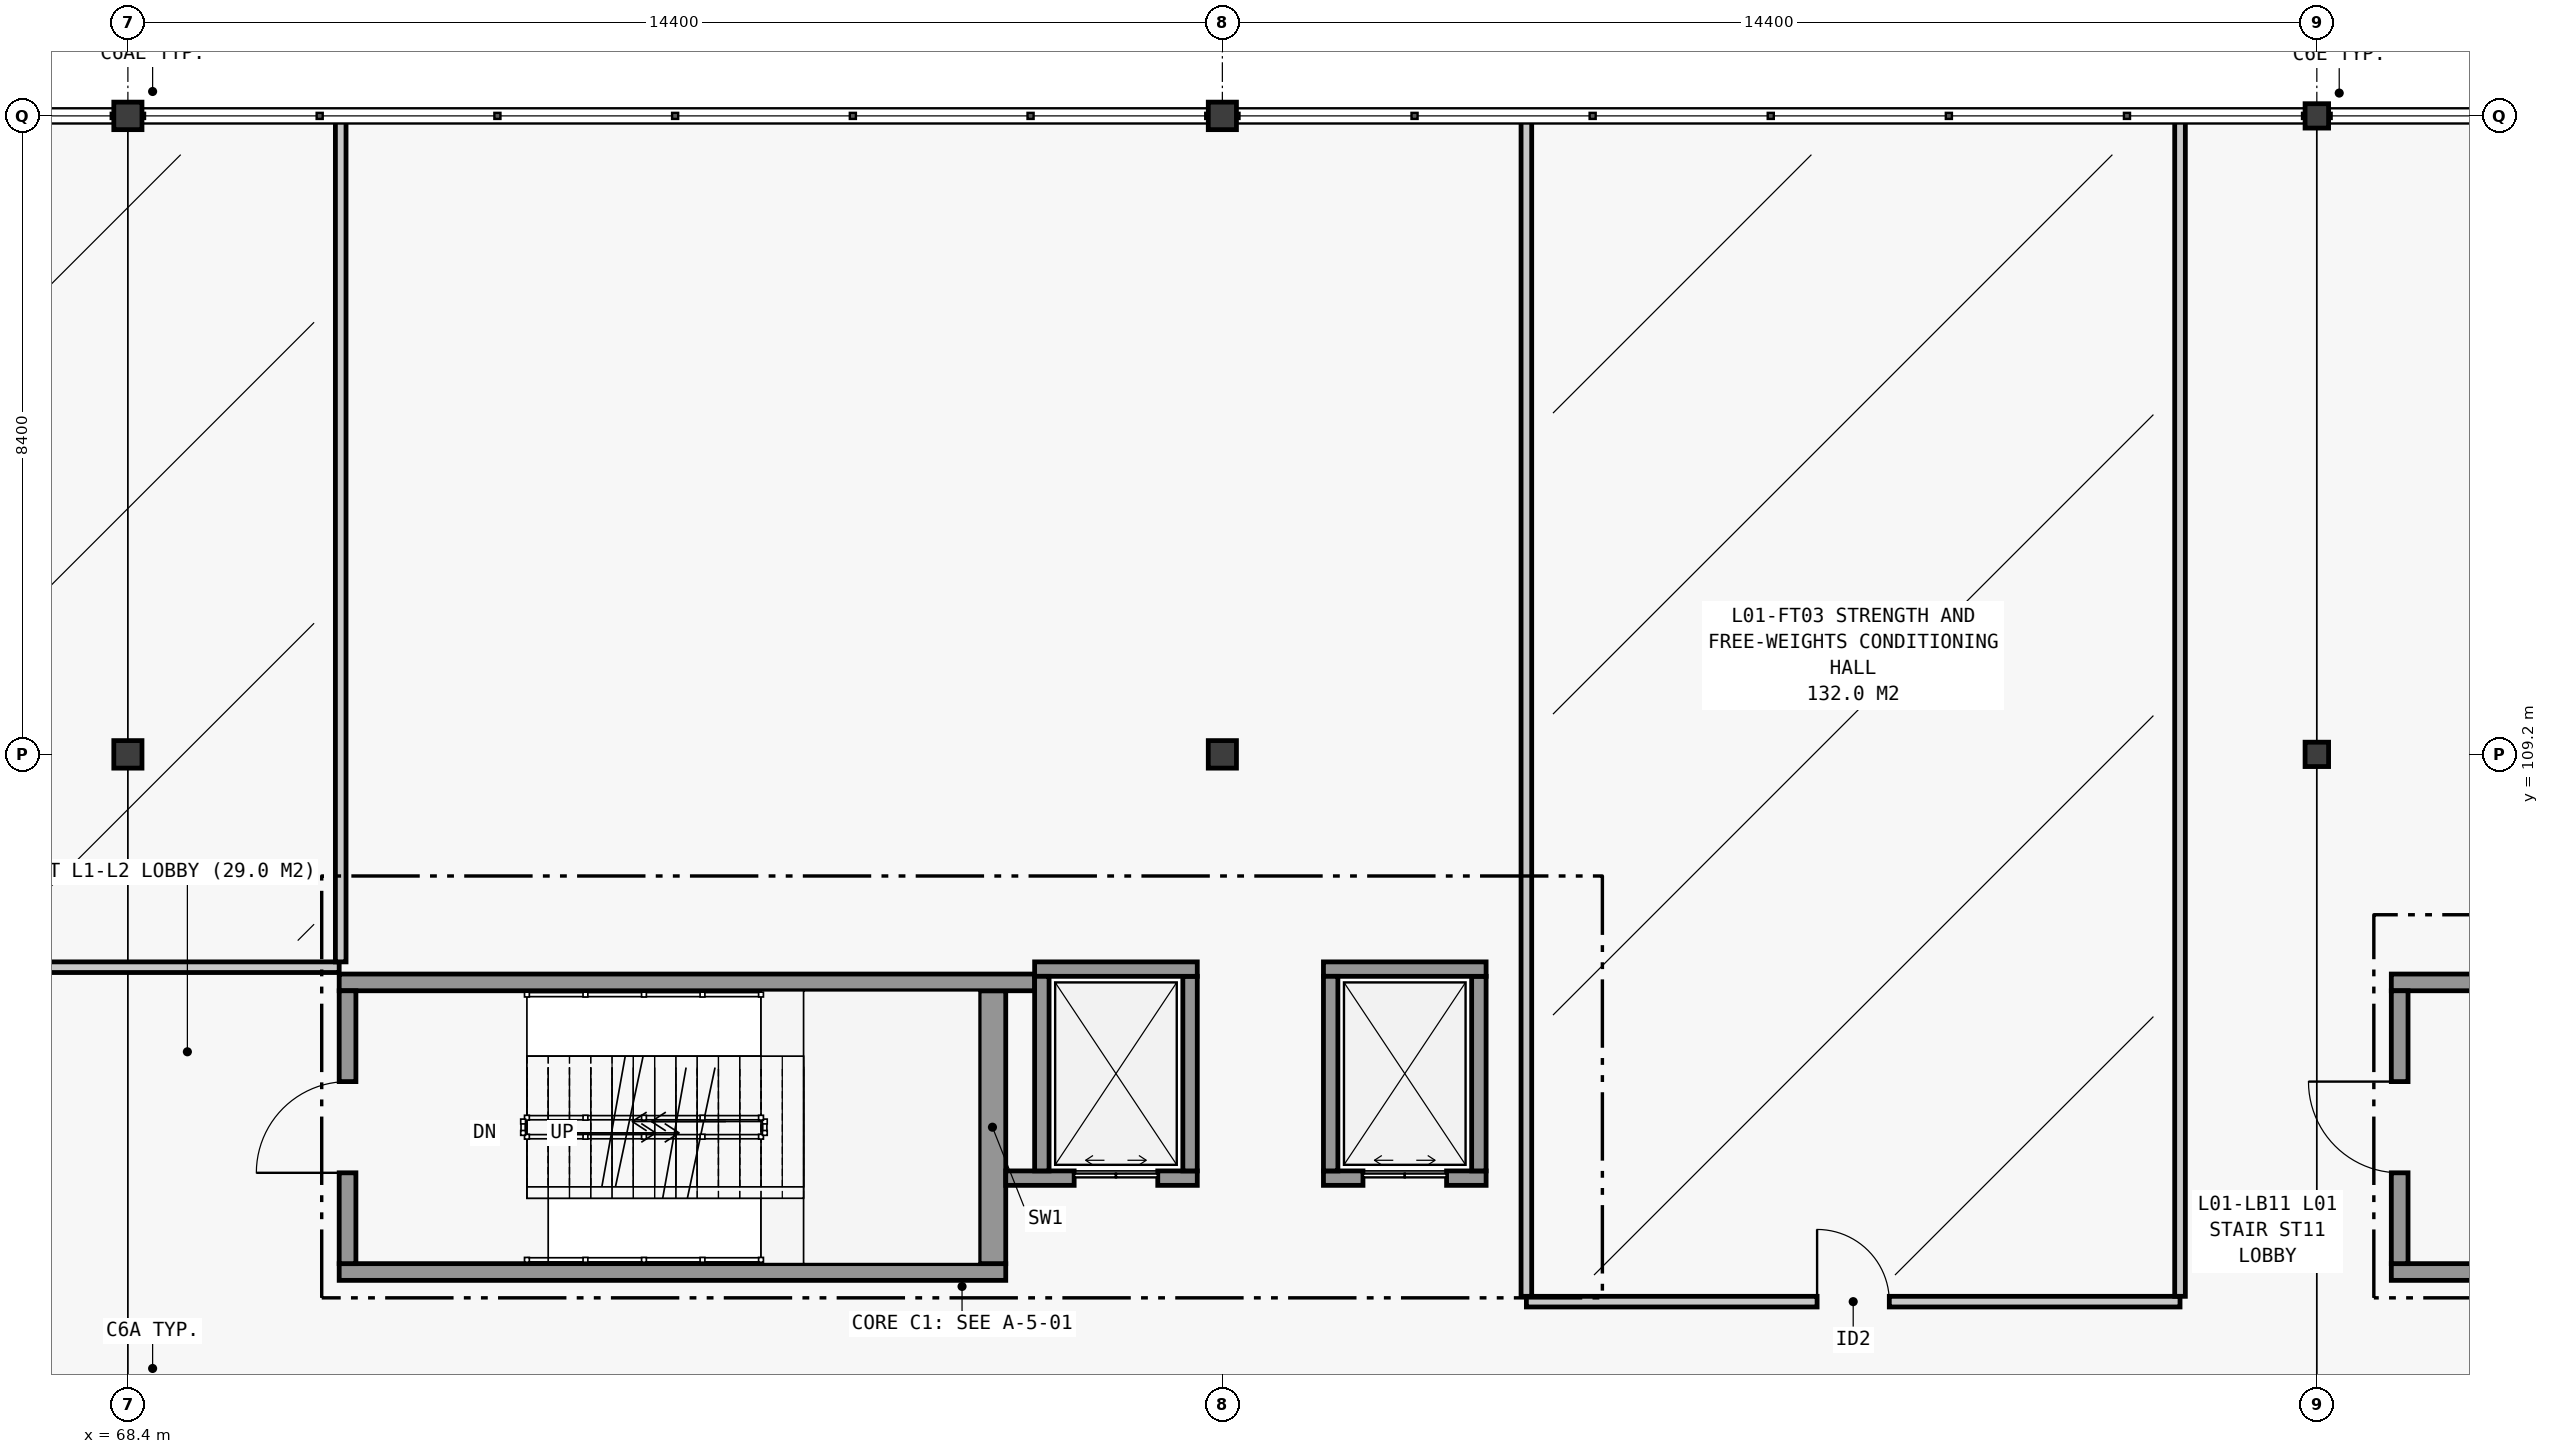
"""IFC4 building model, lengths in metres.
Left out: names, types, materials, properties, quantities, classifications, styles, units other than length and angle.
Written with IfcOpenShell. Run it as: python <this file> out.ifc"""

import sys

from ifc_helpers import new_model, si_unit, direction, frame, frame_2d, origin, origin_2d, place, context, subcontext, project, spatial, rectangle, i_section, extrude, element, fill, save


model = new_model("IFC4")
c1 = context("Model", 3, precision=1e-05, world=origin(), true_north=direction((0.0, 1.0)))
c2 = subcontext(c1, "Body", "Model", "MODEL_VIEW")
j1 = project(units=[si_unit("LENGTHUNIT", "METRE"), si_unit("PLANEANGLEUNIT", "RADIAN")], contexts=[c1])
p1 = place(None, origin())
s1 = spatial("IfcSite", under=j1, at=p1, CompositionType="ELEMENT")
p2 = place(p1, origin())
s2 = spatial("IfcBuilding", under=s1, at=p2, CompositionType="ELEMENT")
p3 = place(p2, frame((0.0, 0.0, 4.8)))
s3 = spatial("IfcBuildingStorey", under=s2, at=p3, CompositionType="ELEMENT", Elevation=4.8)
for number, where, z_axis, x_axis in (
    (1, (68.4, 109.2, 0.0), (0.0, 0.0, 1.0), (1.0, 0.0, 0.0)),
    (2, (68.4, 117.6, 0.0), (0.0, 0.0, 1.0), (1.0, 0.0, 0.0)),
    (3, (82.8, 109.2, 0.0), (0.0, 0.0, 1.0), (1.0, 0.0, 0.0)),
    (4, (82.8, 117.6, 0.0), (0.0, 0.0, 1.0), (1.0, 0.0, 0.0)),
):
    element("IfcColumn", number, at=place(p3, frame(where, z_axis=z_axis, x_axis=x_axis)), inside=s3, PredefinedType="COLUMN", context=c2, shape_type="SweptSolid", body=[
        extrude(i_section(OverallWidth=0.371, OverallDepth=0.362, WebThickness=0.012, FlangeThickness=0.021, FilletRadius=0.015, at=origin_2d()), origin(), (0.0, 0.0, 1.0), 4.2),
    ])
for number, where, z_axis, x_axis in (
    (5, (97.2, 109.2, 0.0), (0.0, 0.0, 1.0), (1.0, 0.0, 0.0)),
    (6, (97.2, 117.6, 0.0), (0.0, 0.0, 1.0), (1.0, 0.0, 0.0)),
):
    element("IfcColumn", number, at=place(p3, frame(where, z_axis=z_axis, x_axis=x_axis)), inside=s3, PredefinedType="COLUMN", context=c2, shape_type="SweptSolid", body=[
        extrude(i_section(OverallWidth=0.309, OverallDepth=0.321, WebThickness=0.014, FlangeThickness=0.022, FilletRadius=0.015, at=origin_2d()), origin(), (0.0, 0.0, 1.0), 4.2),
    ])
p4 = place(p3, frame((71.18, 102.39, 0.0), z_axis=(0.0, 0.0, 1.0), x_axis=(1.0, 0.0, 0.0)))
e7 = element("IfcWall", 7, at=p4, inside=s3, PredefinedType="SOLIDWALL", context=c2, shape_type="SweptSolid", body=[
    extrude(rectangle(XDim=8.77, YDim=0.22, at=frame_2d((4.385, 0.0))), origin(), (0.0, 0.0, 1.0), 3.94),
])
p5 = place(p3, frame((79.775, 102.5, 0.0), z_axis=(0.0, 0.0, 1.0), x_axis=(0.0, 1.0, 0.0)))
e8 = element("IfcWall", 8, at=p5, inside=s3, PredefinedType="SHEAR", context=c2, shape_type="SweptSolid", body=[
    extrude(rectangle(XDim=3.59, YDim=0.35, at=frame_2d((1.795, 0.0))), origin(), (0.0, 0.0, 1.0), 3.94),
])
p6 = place(p3, frame((80.33, 106.2, 0.0), z_axis=(0.0, 0.0, 1.0), x_axis=(-1.0, 0.0, 0.0)))
e9 = element("IfcWall", 9, at=p6, inside=s3, PredefinedType="SOLIDWALL", context=c2, shape_type="SweptSolid", body=[
    extrude(rectangle(XDim=9.15, YDim=0.22, at=frame_2d((4.575, 0.0))), origin(), (0.0, 0.0, 1.0), 3.94),
])
p7 = place(p3, frame((71.29, 106.09, 0.0), z_axis=(0.0, 0.0, 1.0), x_axis=(0.0, -1.0, 0.0)))
e10 = element("IfcWall", 10, at=p7, inside=s3, PredefinedType="SOLIDWALL", context=c2, shape_type="SweptSolid", body=[
    extrude(rectangle(XDim=3.59, YDim=0.22, at=frame_2d((1.795, 0.0))), origin(), (0.0, 0.0, 1.0), 3.94),
])
p8 = place(p7, frame((1.195, 0.0, 0.0)))
e11 = element("IfcOpeningElement", 11, at=p8, cuts=e10, PredefinedType="OPENING", context=c2, shape_type="SweptSolid", body=[
    extrude(rectangle(XDim=1.2, YDim=2.2, at=frame_2d((0.6, 1.1))), frame((0.0, 0.125, 0.0), z_axis=(0.0, -1.0, 0.0), x_axis=(1.0, 0.0, 0.0)), (0.0, 0.0, 1.0), 0.25),
])
for number, where, z_axis, x_axis in (
    (12, (98.18, 102.39, 0.0), (0.0, 0.0, 1.0), (1.0, 0.0, 0.0)),
    (13, (106.95, 106.2, 0.0), (0.0, 0.0, 1.0), (-1.0, 0.0, 0.0)),
):
    element("IfcWall", number, at=place(p3, frame(where, z_axis=z_axis, x_axis=x_axis)), inside=s3, PredefinedType="SOLIDWALL", context=c2, shape_type="SweptSolid", body=[
        extrude(rectangle(XDim=8.77, YDim=0.22, at=frame_2d((4.385, 0.0))), origin(), (0.0, 0.0, 1.0), 3.94),
    ])
p9 = place(p3, frame((98.29, 106.09, 0.0), z_axis=(0.0, 0.0, 1.0), x_axis=(0.0, -1.0, 0.0)))
e14 = element("IfcWall", 14, at=p9, inside=s3, PredefinedType="SOLIDWALL", context=c2, shape_type="SweptSolid", body=[
    extrude(rectangle(XDim=3.59, YDim=0.22, at=frame_2d((1.795, 0.0))), origin(), (0.0, 0.0, 1.0), 3.94),
])
p10 = place(p9, frame((1.195, 0.0, 0.0)))
e15 = element("IfcOpeningElement", 15, at=p10, cuts=e14, PredefinedType="OPENING", context=c2, shape_type="SweptSolid", body=[
    extrude(rectangle(XDim=1.2, YDim=2.2, at=frame_2d((0.6, 1.1))), frame((0.0, 0.125, 0.0), z_axis=(0.0, -1.0, 0.0), x_axis=(1.0, 0.0, 0.0)), (0.0, 0.0, 1.0), 0.25),
])
p11 = place(p3, frame((79.95, 103.625, 0.0), z_axis=(0.0, 0.0, 1.0), x_axis=(1.0, 0.0, 0.0)))
e16 = element("IfcWall", 16, at=p11, inside=s3, PredefinedType="SOLIDWALL", context=c2, shape_type="SweptSolid", body=[
    extrude(rectangle(XDim=2.52, YDim=0.19, at=frame_2d((1.26, 0.0))), origin(), (0.0, 0.0, 1.0), 3.94),
])
p12 = place(p11, frame((0.9, 0.0, 0.0)))
e17 = element("IfcOpeningElement", 17, at=p12, cuts=e16, PredefinedType="OPENING", context=c2, shape_type="SweptSolid", body=[
    extrude(rectangle(XDim=1.1, YDim=2.2, at=frame_2d((0.55, 1.1))), frame((0.0, 0.11, 0.0), z_axis=(0.0, -1.0, 0.0), x_axis=(1.0, 0.0, 0.0)), (0.0, 0.0, 1.0), 0.22),
])
p13 = place(p3, frame((82.375, 103.72, 0.0), z_axis=(0.0, 0.0, 1.0), x_axis=(0.0, 1.0, 0.0)))
e18 = element("IfcWall", 18, at=p13, inside=s3, PredefinedType="SOLIDWALL", context=c2, shape_type="SweptSolid", body=[
    extrude(rectangle(XDim=2.56, YDim=0.19, at=frame_2d((1.28, 0.0))), origin(), (0.0, 0.0, 1.0), 3.94),
])
p14 = place(p3, frame((82.47, 106.375, 0.0), z_axis=(0.0, 0.0, 1.0), x_axis=(-1.0, 0.0, 0.0)))
e19 = element("IfcWall", 19, at=p14, inside=s3, PredefinedType="SOLIDWALL", context=c2, shape_type="SweptSolid", body=[
    extrude(rectangle(XDim=2.14, YDim=0.19, at=frame_2d((1.07, 0.0))), origin(), (0.0, 0.0, 1.0), 3.94),
])
p15 = place(p3, frame((80.425, 106.28, 0.0), z_axis=(0.0, 0.0, 1.0), x_axis=(0.0, -1.0, 0.0)))
e20 = element("IfcWall", 20, at=p15, inside=s3, PredefinedType="SOLIDWALL", context=c2, shape_type="SweptSolid", body=[
    extrude(rectangle(XDim=2.56, YDim=0.19, at=frame_2d((1.28, 0.0))), origin(), (0.0, 0.0, 1.0), 3.94),
])
p16 = place(p3, frame((84.13, 103.625, 0.0), z_axis=(0.0, 0.0, 1.0), x_axis=(1.0, 0.0, 0.0)))
e21 = element("IfcWall", 21, at=p16, inside=s3, PredefinedType="SOLIDWALL", context=c2, shape_type="SweptSolid", body=[
    extrude(rectangle(XDim=2.14, YDim=0.19, at=frame_2d((1.07, 0.0))), origin(), (0.0, 0.0, 1.0), 3.94),
])
p17 = place(p16, frame((0.52, 0.0, 0.0)))
e22 = element("IfcOpeningElement", 22, at=p17, cuts=e21, PredefinedType="OPENING", context=c2, shape_type="SweptSolid", body=[
    extrude(rectangle(XDim=1.1, YDim=2.2, at=frame_2d((0.55, 1.1))), frame((0.0, 0.11, 0.0), z_axis=(0.0, -1.0, 0.0), x_axis=(1.0, 0.0, 0.0)), (0.0, 0.0, 1.0), 0.22),
])
p18 = place(p3, frame((86.175, 103.72, 0.0), z_axis=(0.0, 0.0, 1.0), x_axis=(0.0, 1.0, 0.0)))
e23 = element("IfcWall", 23, at=p18, inside=s3, PredefinedType="SOLIDWALL", context=c2, shape_type="SweptSolid", body=[
    extrude(rectangle(XDim=2.56, YDim=0.19, at=frame_2d((1.28, 0.0))), origin(), (0.0, 0.0, 1.0), 3.94),
])
p19 = place(p3, frame((86.27, 106.375, 0.0), z_axis=(0.0, 0.0, 1.0), x_axis=(-1.0, 0.0, 0.0)))
e24 = element("IfcWall", 24, at=p19, inside=s3, PredefinedType="SOLIDWALL", context=c2, shape_type="SweptSolid", body=[
    extrude(rectangle(XDim=2.14, YDim=0.19, at=frame_2d((1.07, 0.0))), origin(), (0.0, 0.0, 1.0), 3.94),
])
p20 = place(p3, frame((84.225, 106.28, 0.0), z_axis=(0.0, 0.0, 1.0), x_axis=(0.0, -1.0, 0.0)))
e25 = element("IfcWall", 25, at=p20, inside=s3, PredefinedType="SOLIDWALL", context=c2, shape_type="SweptSolid", body=[
    extrude(rectangle(XDim=2.56, YDim=0.19, at=frame_2d((1.28, 0.0))), origin(), (0.0, 0.0, 1.0), 3.94),
])
p21 = place(p3, frame((65.7, 106.4, 0.0), z_axis=(0.0, 0.0, 1.0), x_axis=(1.0, 0.0, 0.0)))
e26 = element("IfcWall", 26, at=p21, inside=s3, PredefinedType="PARTITIONING", context=c2, shape_type="SweptSolid", body=[
    extrude(rectangle(XDim=5.48, YDim=0.14, at=frame_2d((2.74, 0.0))), origin(), (0.0, 0.0, 1.0), 3.94),
])
p22 = place(p3, frame((71.2, 106.47, 0.0), z_axis=(0.0, 0.0, 1.0), x_axis=(0.0, 1.0, 0.0)))
e27 = element("IfcWall", 27, at=p22, inside=s3, PredefinedType="PARTITIONING", context=c2, shape_type="SweptSolid", body=[
    extrude(rectangle(XDim=11.11, YDim=0.14, at=frame_2d((5.555, 0.0))), origin(), (0.0, 0.0, 1.0), 3.94),
])
p23 = place(p3, frame((86.8, 102.0, 0.0), z_axis=(0.0, 0.0, 1.0), x_axis=(1.0, 0.0, 0.0)))
e28 = element("IfcWall", 28, at=p23, inside=s3, PredefinedType="PARTITIONING", context=c2, shape_type="SweptSolid", body=[
    extrude(rectangle(XDim=8.6, YDim=0.14, at=frame_2d((4.3, 0.0))), origin(), (0.0, 0.0, 1.0), 3.94),
])
p24 = place(p23, frame((3.825, 0.0, 0.0)))
e29 = element("IfcOpeningElement", 29, at=p24, cuts=e28, PredefinedType="OPENING", context=c2, shape_type="SweptSolid", body=[
    extrude(rectangle(XDim=0.95, YDim=2.15, at=frame_2d((0.475, 1.075))), frame((0.0, 0.085, 0.0), z_axis=(0.0, -1.0, 0.0), x_axis=(1.0, 0.0, 0.0)), (0.0, 0.0, 1.0), 0.17),
])
for number, where, z_axis, x_axis in (
    (30, (86.8, 102.07, 0.0), (0.0, 0.0, 1.0), (0.0, 1.0, 0.0)),
    (31, (95.4, 102.07, 0.0), (0.0, 0.0, 1.0), (0.0, 1.0, 0.0)),
):
    element("IfcWall", number, at=place(p3, frame(where, z_axis=z_axis, x_axis=x_axis)), inside=s3, PredefinedType="PARTITIONING", context=c2, shape_type="SweptSolid", body=[
        extrude(rectangle(XDim=15.51, YDim=0.14, at=frame_2d((7.755, 0.0))), origin(), (0.0, 0.0, 1.0), 3.94),
    ])
p25 = place(p8, frame((1.2, 0.0, 0.0), z_axis=(0.0, 0.0, 1.0), x_axis=(-1.0, 0.0, 0.0)))
e32 = element("IfcDoor", 32, at=p25, inside=s3, OperationType="SINGLE_SWING_RIGHT", PredefinedType="DOOR", context=c2, shape_type="SweptSolid", body=[
    extrude(rectangle(XDim=1.2, YDim=2.2, at=frame_2d((0.6, 1.1))), frame((0.0, 0.025, 0.0), z_axis=(0.0, -1.0, 0.0), x_axis=(1.0, 0.0, 0.0)), (0.0, 0.0, 1.0), 0.05),
])
fill(e11, e32)
p26 = place(p10, frame((1.2, 0.0, 0.0), z_axis=(0.0, 0.0, 1.0), x_axis=(-1.0, 0.0, 0.0)))
e33 = element("IfcDoor", 33, at=p26, inside=s3, OperationType="SINGLE_SWING_LEFT", PredefinedType="DOOR", context=c2, shape_type="SweptSolid", body=[
    extrude(rectangle(XDim=1.2, YDim=2.2, at=frame_2d((0.6, 1.1))), frame((0.0, 0.025, 0.0), z_axis=(0.0, -1.0, 0.0), x_axis=(1.0, 0.0, 0.0)), (0.0, 0.0, 1.0), 0.05),
])
fill(e15, e33)
p27 = place(p12, origin())
e34 = element("IfcDoor", 34, at=p27, inside=s3, OperationType="DOUBLE_DOOR_SLIDING", PredefinedType="DOOR", context=c2, shape_type="SweptSolid", body=[
    extrude(rectangle(XDim=1.1, YDim=2.2, at=frame_2d((0.55, 1.1))), frame((0.0, 0.025, 0.0), z_axis=(0.0, -1.0, 0.0), x_axis=(1.0, 0.0, 0.0)), (0.0, 0.0, 1.0), 0.05),
])
fill(e17, e34)
p28 = place(p17, origin())
e35 = element("IfcDoor", 35, at=p28, inside=s3, OperationType="DOUBLE_DOOR_SLIDING", PredefinedType="DOOR", context=c2, shape_type="SweptSolid", body=[
    extrude(rectangle(XDim=1.1, YDim=2.2, at=frame_2d((0.55, 1.1))), frame((0.0, 0.025, 0.0), z_axis=(0.0, -1.0, 0.0), x_axis=(1.0, 0.0, 0.0)), (0.0, 0.0, 1.0), 0.05),
])
fill(e22, e35)
p29 = place(p24, origin())
e36 = element("IfcDoor", 36, at=p29, inside=s3, OperationType="SINGLE_SWING_LEFT", PredefinedType="DOOR", context=c2, shape_type="SweptSolid", body=[
    extrude(rectangle(XDim=0.95, YDim=2.15, at=frame_2d((0.475, 1.075))), frame((0.0, 0.025, 0.0), z_axis=(0.0, -1.0, 0.0), x_axis=(1.0, 0.0, 0.0)), (0.0, 0.0, 1.0), 0.05),
])
fill(e29, e36)
save(model, sys.argv[1])
